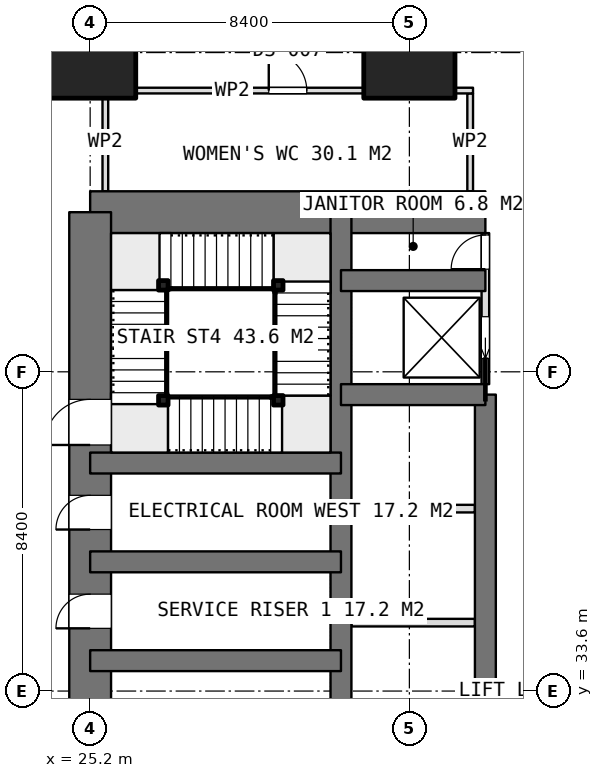
"""IFC4 building model, lengths in metres.
Left out: names, types, materials, properties, quantities, classifications, styles, units other than length and angle.
Written with IfcOpenShell. Run it as: python <this file> out.ifc"""

import sys

from ifc_helpers import new_model, si_unit, direction, frame, frame_2d, origin, origin_2d, place, context, subcontext, project, spatial, rectangle, extrude, element, fill, save


model = new_model("IFC4")
c1 = context("Model", 3, precision=1e-05, world=origin(), true_north=direction((0.0, 1.0)))
c2 = subcontext(c1, "Body", "Model", "MODEL_VIEW")
j1 = project(units=[si_unit("LENGTHUNIT", "METRE"), si_unit("PLANEANGLEUNIT", "RADIAN")], contexts=[c1])
p1 = place(None, origin())
s1 = spatial("IfcSite", under=j1, at=p1, CompositionType="ELEMENT")
p2 = place(p1, origin())
s2 = spatial("IfcBuilding", under=s1, at=p2, CompositionType="ELEMENT")
p3 = place(p2, frame((0.0, 0.0, -5.4)))
s3 = spatial("IfcBuildingStorey", under=s2, at=p3, CompositionType="ELEMENT", Elevation=-5.4)
p4 = place(p3, frame((25.2, 46.2, 0.0), z_axis=(0.0, 0.0, 1.0), x_axis=(1.0, 0.0, 0.0)))
e1 = element("IfcWall", 1, at=p4, inside=s3, PredefinedType="SHEAR", context=c2, shape_type="SweptSolid", body=[
    extrude(rectangle(XDim=10.4, YDim=1.1, at=frame_2d((5.2, 0.0))), origin(), (0.0, 0.0, 1.0), 5.4),
])
p5 = place(p3, frame((25.2, 21.0, 0.0), z_axis=(0.0, 0.0, 1.0), x_axis=(0.0, 1.0, 0.0)))
e2 = element("IfcWall", 2, at=p5, inside=s3, PredefinedType="SHEAR", context=c2, shape_type="SweptSolid", body=[
    extrude(rectangle(XDim=25.2, YDim=1.1, at=frame_2d((12.6, 0.0))), origin(), (0.0, 0.0, 1.0), 5.4),
])
p6 = place(p5, frame((7.8, 0.0, 0.0)))
e3 = element("IfcOpeningElement", 3, at=p6, cuts=e2, PredefinedType="OPENING", context=c2, shape_type="SweptSolid", body=[
    extrude(rectangle(XDim=1.2, YDim=2.1, at=frame_2d((0.6, 1.05))), frame((0.0, 0.56, 0.0), z_axis=(0.0, -1.0, 0.0), x_axis=(1.0, 0.0, 0.0)), (0.0, 0.0, 1.0), 1.12),
])
p7 = place(p5, frame((14.25, 0.0, 0.0)))
e4 = element("IfcOpeningElement", 4, at=p7, cuts=e2, PredefinedType="OPENING", context=c2, shape_type="SweptSolid", body=[
    extrude(rectangle(XDim=0.9, YDim=2.1, at=frame_2d((0.45, 1.05))), frame((0.0, 0.56, 0.0), z_axis=(0.0, -1.0, 0.0), x_axis=(1.0, 0.0, 0.0)), (0.0, 0.0, 1.0), 1.12),
])
p8 = place(p5, frame((16.85, 0.0, 0.0)))
e5 = element("IfcOpeningElement", 5, at=p8, cuts=e2, PredefinedType="OPENING", context=c2, shape_type="SweptSolid", body=[
    extrude(rectangle(XDim=0.9, YDim=2.1, at=frame_2d((0.45, 1.05))), frame((0.0, 0.56, 0.0), z_axis=(0.0, -1.0, 0.0), x_axis=(1.0, 0.0, 0.0)), (0.0, 0.0, 1.0), 1.12),
])
p9 = place(p5, frame((19.075, 0.0, 0.0)))
e6 = element("IfcOpeningElement", 6, at=p9, cuts=e2, PredefinedType="OPENING", context=c2, shape_type="SweptSolid", body=[
    extrude(rectangle(XDim=1.2, YDim=2.1, at=frame_2d((0.6, 1.05))), frame((0.0, 0.56, 0.0), z_axis=(0.0, -1.0, 0.0), x_axis=(1.0, 0.0, 0.0)), (0.0, 0.0, 1.0), 1.12),
])
p10 = place(p3, frame((31.8, 21.0, 0.0), z_axis=(0.0, 0.0, 1.0), x_axis=(0.0, 1.0, 0.0)))
e7 = element("IfcWall", 7, at=p10, inside=s3, PredefinedType="SHEAR", context=c2, shape_type="SweptSolid", body=[
    extrude(rectangle(XDim=25.2, YDim=0.55, at=frame_2d((12.6, 0.0))), origin(), (0.0, 0.0, 1.0), 5.4),
])
p11 = place(p3, frame((35.6, 23.4, 0.0), z_axis=(0.0, 0.0, 1.0), x_axis=(0.0, 1.0, 0.0)))
e8 = element("IfcWall", 8, at=p11, inside=s3, PredefinedType="SHEAR", context=c2, shape_type="SweptSolid", body=[
    extrude(rectangle(XDim=18.0, YDim=0.55, at=frame_2d((9.0, 0.0))), origin(), (0.0, 0.0, 1.0), 5.4),
])
for number, where, z_axis, x_axis in (
    (9, (31.8, 41.4, 0.0), (0.0, 0.0, 1.0), (1.0, 0.0, 0.0)),
    (10, (31.8, 44.4, 0.0), (0.0, 0.0, 1.0), (1.0, 0.0, 0.0)),
):
    element("IfcWall", number, at=place(p3, frame(where, z_axis=z_axis, x_axis=x_axis)), inside=s3, PredefinedType="SHEAR", context=c2, shape_type="SweptSolid", body=[
        extrude(rectangle(XDim=3.8, YDim=0.55, at=frame_2d((1.9, 0.0))), origin(), (0.0, 0.0, 1.0), 5.4),
    ])
for number, where, z_axis, x_axis in (
    (11, (25.2, 34.4, 0.0), (0.0, 0.0, 1.0), (1.0, 0.0, 0.0)),
    (12, (25.2, 37.0, 0.0), (0.0, 0.0, 1.0), (1.0, 0.0, 0.0)),
    (13, (25.2, 39.6, 0.0), (0.0, 0.0, 1.0), (1.0, 0.0, 0.0)),
):
    element("IfcWall", number, at=place(p3, frame(where, z_axis=z_axis, x_axis=x_axis)), inside=s3, PredefinedType="SHEAR", context=c2, shape_type="SweptSolid", body=[
        extrude(rectangle(XDim=6.6, YDim=0.55, at=frame_2d((3.3, 0.0))), origin(), (0.0, 0.0, 1.0), 5.4),
    ])
for number, where, z_axis, x_axis in (
    (14, (25.2, 50.4, 0.0), (0.0, 0.0, 1.0), (1.0, 0.0, 0.0)),
    (15, (33.6, 50.4, 0.0), (0.0, 0.0, 1.0), (1.0, 0.0, 0.0)),
):
    element("IfcColumn", number, at=place(p3, frame(where, z_axis=z_axis, x_axis=x_axis)), inside=s3, PredefinedType="COLUMN", context=c2, shape_type="SweptSolid", body=[
        extrude(rectangle(XDim=2.4, YDim=2.4, at=origin_2d()), origin(), (0.0, 0.0, 1.0), 5.4),
    ])
for number, where, z_axis, x_axis in (
    (16, (32.075, 35.4, 0.0), (0.0, 0.0, 1.0), (1.0, 0.0, 0.0)),
    (17, (32.075, 38.4, 0.0), (0.0, 0.0, 1.0), (1.0, 0.0, 0.0)),
):
    element("IfcWall", number, at=place(p3, frame(where, z_axis=z_axis, x_axis=x_axis)), inside=s3, PredefinedType="PARTITIONING", context=c2, shape_type="SweptSolid", body=[
        extrude(rectangle(XDim=3.25, YDim=0.2, at=frame_2d((1.625, 0.0))), origin(), (0.0, 0.0, 1.0), 5.1),
    ])
p12 = place(p3, frame((35.6, 41.675, 0.0), z_axis=(0.0, 0.0, 1.0), x_axis=(0.0, 1.0, 0.0)))
e18 = element("IfcWall", 18, at=p12, inside=s3, PredefinedType="PARTITIONING", context=c2, shape_type="SweptSolid", body=[
    extrude(rectangle(XDim=3.975, YDim=0.2, at=frame_2d((1.987, 0.0))), origin(), (0.0, 0.0, 1.0), 5.1),
])
p13 = place(p12, frame((3.025, 0.0, 0.0)))
e19 = element("IfcOpeningElement", 19, at=p13, cuts=e18, PredefinedType="OPENING", context=c2, shape_type="SweptSolid", body=[
    extrude(rectangle(XDim=0.9, YDim=2.1, at=frame_2d((0.45, 1.05))), frame((0.0, 0.11, 0.0), z_axis=(0.0, -1.0, 0.0), x_axis=(1.0, 0.0, 0.0)), (0.0, 0.0, 1.0), 0.22),
])
p14 = place(p12, frame((0.675, 0.0, 0.0)))
e20 = element("IfcOpeningElement", 20, at=p14, cuts=e18, PredefinedType="OPENING", context=c2, shape_type="SweptSolid", body=[
    extrude(rectangle(XDim=1.1, YDim=2.1, at=frame_2d((0.55, 1.05))), frame((0.0, 0.11, 0.0), z_axis=(0.0, -1.0, 0.0), x_axis=(1.0, 0.0, 0.0)), (0.0, 0.0, 1.0), 0.22),
])
p15 = place(p3, frame((25.525, 49.4, 0.0), z_axis=(0.0, 0.0, 1.0), x_axis=(1.0, 0.0, 0.0)))
e21 = element("IfcWall", 21, at=p15, inside=s3, PredefinedType="PARTITIONING", context=c2, shape_type="SweptSolid", body=[
    extrude(rectangle(XDim=9.75, YDim=0.15, at=frame_2d((4.875, 0.0))), origin(), (0.0, 0.0, 1.0), 5.1),
])
p16 = place(p15, frame((4.375, 0.0, 0.0)))
e22 = element("IfcOpeningElement", 22, at=p16, cuts=e21, PredefinedType="OPENING", context=c2, shape_type="SweptSolid", body=[
    extrude(rectangle(XDim=1.0, YDim=2.1, at=frame_2d((0.5, 1.05))), frame((0.0, 0.085, 0.0), z_axis=(0.0, -1.0, 0.0), x_axis=(1.0, 0.0, 0.0)), (0.0, 0.0, 1.0), 0.17),
])
for number, where, z_axis, x_axis in (
    (23, (25.6, 46.75, 0.0), (0.0, 0.0, 1.0), (0.0, 1.0, 0.0)),
    (24, (35.2, 46.75, 0.0), (0.0, 0.0, 1.0), (0.0, 1.0, 0.0)),
):
    element("IfcWall", number, at=place(p3, frame(where, z_axis=z_axis, x_axis=x_axis)), inside=s3, PredefinedType="PARTITIONING", context=c2, shape_type="SweptSolid", body=[
        extrude(rectangle(XDim=2.575, YDim=0.15, at=frame_2d((1.288, 0.0))), origin(), (0.0, 0.0, 1.0), 5.1),
    ])
for number, where, z_axis, x_axis in (
    (25, (27.125, 41.25, 0.0), (0.0, 0.0, 1.0), (1.0, 0.0, 0.0)),
    (26, (30.15, 41.25, 0.0), (0.0, 0.0, 1.0), (1.0, 0.0, 0.0)),
    (27, (30.15, 44.275, 0.0), (0.0, 0.0, 1.0), (1.0, 0.0, 0.0)),
    (28, (27.125, 44.275, 0.0), (0.0, 0.0, 1.0), (1.0, 0.0, 0.0)),
):
    element("IfcColumn", number, at=place(p3, frame(where, z_axis=z_axis, x_axis=x_axis)), inside=s3, PredefinedType="COLUMN", context=c2, shape_type="SweptSolid", body=[
        extrude(rectangle(XDim=0.25, YDim=0.25, at=origin_2d()), origin(), (0.0, 0.0, 1.0), 5.4),
    ])
p17 = place(p7, origin())
e29 = element("IfcDoor", 29, at=p17, inside=s3, OperationType="SINGLE_SWING_LEFT", PredefinedType="DOOR", context=c2, shape_type="SweptSolid", body=[
    extrude(rectangle(XDim=0.9, YDim=2.1, at=frame_2d((0.45, 1.05))), frame((0.0, 0.025, 0.0), z_axis=(0.0, -1.0, 0.0), x_axis=(1.0, 0.0, 0.0)), (0.0, 0.0, 1.0), 0.05),
])
fill(e4, e29)
p18 = place(p8, origin())
e30 = element("IfcDoor", 30, at=p18, inside=s3, OperationType="SINGLE_SWING_LEFT", PredefinedType="DOOR", context=c2, shape_type="SweptSolid", body=[
    extrude(rectangle(XDim=0.9, YDim=2.1, at=frame_2d((0.45, 1.05))), frame((0.0, 0.025, 0.0), z_axis=(0.0, -1.0, 0.0), x_axis=(1.0, 0.0, 0.0)), (0.0, 0.0, 1.0), 0.05),
])
fill(e5, e30)
p19 = place(p13, origin())
e31 = element("IfcDoor", 31, at=p19, inside=s3, OperationType="SINGLE_SWING_LEFT", PredefinedType="DOOR", context=c2, shape_type="SweptSolid", body=[
    extrude(rectangle(XDim=0.9, YDim=2.1, at=frame_2d((0.45, 1.05))), frame((0.0, 0.025, 0.0), z_axis=(0.0, -1.0, 0.0), x_axis=(1.0, 0.0, 0.0)), (0.0, 0.0, 1.0), 0.05),
])
fill(e19, e31)
p20 = place(p14, origin())
e32 = element("IfcDoor", 32, at=p20, inside=s3, OperationType="SLIDING_TO_LEFT", PredefinedType="USERDEFINED", context=c2, shape_type="SweptSolid", body=[
    extrude(rectangle(XDim=1.1, YDim=2.1, at=frame_2d((0.55, 1.05))), frame((0.0, 0.025, 0.0), z_axis=(0.0, -1.0, 0.0), x_axis=(1.0, 0.0, 0.0)), (0.0, 0.0, 1.0), 0.05),
])
fill(e20, e32)
p21 = place(p16, origin())
e33 = element("IfcDoor", 33, at=p21, inside=s3, OperationType="SINGLE_SWING_LEFT", PredefinedType="DOOR", context=c2, shape_type="SweptSolid", body=[
    extrude(rectangle(XDim=1.0, YDim=2.1, at=frame_2d((0.5, 1.05))), frame((0.0, 0.025, 0.0), z_axis=(0.0, -1.0, 0.0), x_axis=(1.0, 0.0, 0.0)), (0.0, 0.0, 1.0), 0.05),
])
fill(e22, e33)
p22 = place(p9, origin())
e34 = element("IfcDoor", 34, at=p22, inside=s3, OperationType="SINGLE_SWING_RIGHT", PredefinedType="DOOR", context=c2, shape_type="SweptSolid", body=[
    extrude(rectangle(XDim=1.2, YDim=2.1, at=frame_2d((0.6, 1.05))), frame((0.0, 0.025, 0.0), z_axis=(0.0, -1.0, 0.0), x_axis=(1.0, 0.0, 0.0)), (0.0, 0.0, 1.0), 0.05),
])
fill(e6, e34)
save(model, sys.argv[1])
